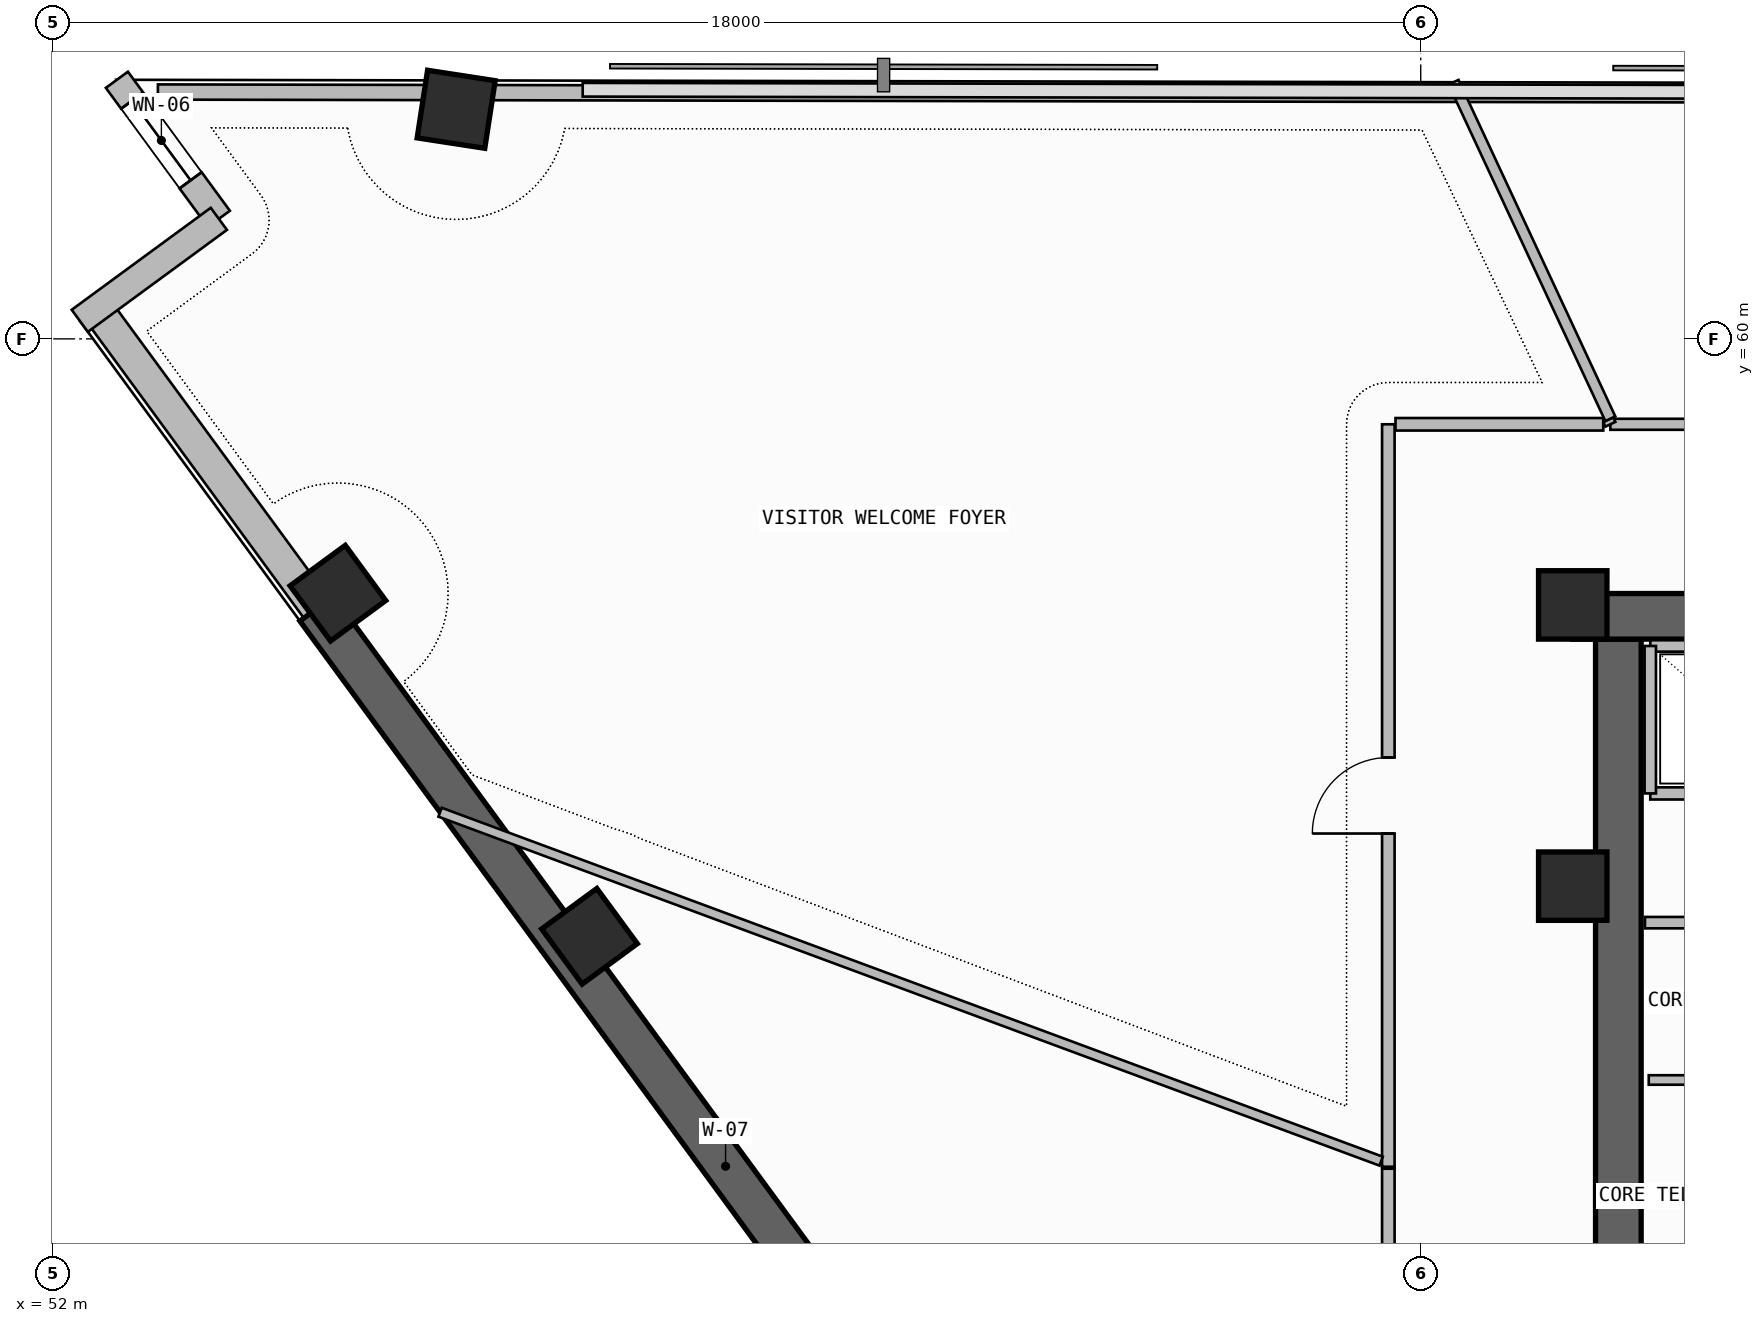
"""IFC4 building model, lengths in metres.
Left out: names, types, materials, properties, quantities, classifications, styles, units other than length and angle.
Written with IfcOpenShell. Run it as: python <this file> out.ifc"""

import sys

from ifc_helpers import new_model, si_unit, direction, frame, frame_2d, origin, origin_2d, place, context, subcontext, project, spatial, rectangle, extrude, element, fill, save


model = new_model("IFC4")
c1 = context("Model", 3, precision=1e-05, world=origin(), true_north=direction((0.0, 1.0)))
c2 = subcontext(c1, "Body", "Model", "MODEL_VIEW")
j1 = project(units=[si_unit("LENGTHUNIT", "METRE"), si_unit("PLANEANGLEUNIT", "RADIAN")], contexts=[c1])
p1 = place(None, origin())
s1 = spatial("IfcSite", under=j1, at=p1, CompositionType="ELEMENT")
p2 = place(p1, origin())
s2 = spatial("IfcBuilding", under=s1, at=p2, CompositionType="ELEMENT")
p3 = place(p2, frame((0.0, 0.0, 250.18)))
s3 = spatial("IfcBuildingStorey", under=s2, at=p3, CompositionType="ELEMENT", Elevation=250.18)
p4 = place(p3, frame((72.6, 43.35, -0.26), z_axis=(0.0, 0.0, 1.0), x_axis=(0.0, 1.0, 0.0)))
e1 = element("IfcWall", 1, at=p4, inside=s3, PredefinedType="SHEAR", context=c2, shape_type="SweptSolid", body=[
    extrude(rectangle(XDim=12.7, YDim=0.6, at=frame_2d((6.35, 0.0))), origin(), (0.0, 0.0, 1.0), 3.52),
])
p5 = place(p4, frame((1.35, 0.0, 0.26)))
e2 = element("IfcOpeningElement", 2, at=p5, cuts=e1, PredefinedType="OPENING", context=c2, shape_type="SweptSolid", body=[
    extrude(rectangle(XDim=1.2, YDim=2.2, at=frame_2d((0.6, 1.1))), frame((0.0, 0.31, 0.0), z_axis=(0.0, -1.0, 0.0), x_axis=(1.0, 0.0, 0.0)), (0.0, 0.0, 1.0), 0.62),
])
p6 = place(p3, frame((72.0, 56.35, -0.26), z_axis=(0.0, 0.0, 1.0), x_axis=(1.0, 0.0, 0.0)))
e3 = element("IfcWall", 3, at=p6, inside=s3, PredefinedType="SHEAR", context=c2, shape_type="SweptSolid", body=[
    extrude(rectangle(XDim=13.6, YDim=0.6, at=frame_2d((6.8, 0.0))), origin(), (0.0, 0.0, 1.0), 3.52),
])
for number, where, z_axis, x_axis in (
    (4, (72.0, 52.8, 0.0), (0.0, 0.0, 1.0), (1.0, 0.0, 0.0)),
    (5, (72.0, 56.5, 0.0), (0.0, 0.0, 1.0), (1.0, 0.0, 0.0)),
    (6, (57.309, 63.021, 0.0), (0.0, 0.0, 1.0), (0.152, 0.988, 0.0)),
    (7, (55.753, 56.654, 0.0), (0.0, 0.0, 1.0), (-0.591, 0.806, 0.0)),
    (8, (59.063, 52.14, 0.0), (0.0, 0.0, 1.0), (-0.591, 0.806, 0.0)),
):
    element("IfcColumn", number, at=place(p3, frame(where, z_axis=z_axis, x_axis=x_axis)), inside=s3, PredefinedType="COLUMN", context=c2, shape_type="SweptSolid", body=[
        extrude(rectangle(XDim=0.9, YDim=0.9, at=origin_2d()), origin(), (0.0, 0.0, 1.0), 3.52),
    ])
p7 = place(p3, frame((52.579, 60.4, 0.0), z_axis=(0.0, 0.0, 1.0), x_axis=(0.591311800505, -0.806443026248, 0.0)))
e9 = element("IfcWall", 9, at=p7, inside=s3, PredefinedType="SOLIDWALL", context=c2, shape_type="SweptSolid", body=[
    extrude(rectangle(XDim=4.898, YDim=0.42, at=frame_2d((2.449, 0.0))), origin(), (0.0, 0.0, 1.0), 2.645),
])
p8 = place(p3, frame((55.475, 56.45, -0.26), z_axis=(0.0, 0.0, 1.0), x_axis=(0.591309555876, -0.806444672082, 0.0)))
e10 = element("IfcWall", 10, at=p8, inside=s3, PredefinedType="SHEAR", context=c2, shape_type="SweptSolid", body=[
    extrude(rectangle(XDim=18.192, YDim=0.55, at=frame_2d((9.096, 0.0))), origin(), (0.0, 0.0, 1.0), 3.52),
])
p9 = place(p3, frame((52.845, 63.409, 0.0), z_axis=(0.0, 0.0, 1.0), x_axis=(0.591251685745, -0.806487101015, 0.0)))
e11 = element("IfcWall", 11, at=p9, inside=s3, PredefinedType="SOLIDWALL", context=c2, shape_type="SweptSolid", body=[
    extrude(rectangle(XDim=2.269, YDim=0.36, at=frame_2d((1.134, 0.0))), origin(), (0.0, 0.0, 1.0), 3.26),
])
p10 = place(p9, frame((0.34, 0.0, 0.45)))
e12 = element("IfcOpeningElement", 12, at=p10, cuts=e11, PredefinedType="OPENING", context=c2, shape_type="SweptSolid", body=[
    extrude(rectangle(XDim=1.3, YDim=2.4, at=frame_2d((0.65, 1.2))), frame((0.0, 0.19, 0.0), z_axis=(0.0, -1.0, 0.0), x_axis=(1.0, 0.0, 0.0)), (0.0, 0.0, 1.0), 0.38),
])
p11 = place(p3, frame((54.187, 61.579, 0.0), z_axis=(0.0, 0.0, 1.0), x_axis=(-0.806449475274, -0.591303005092, 0.0)))
e13 = element("IfcWall", 13, at=p11, inside=s3, PredefinedType="SOLIDWALL", context=c2, shape_type="SweptSolid", body=[
    extrude(rectangle(XDim=2.268, YDim=0.36, at=frame_2d((1.134, 0.0))), origin(), (0.0, 0.0, 1.0), 3.26),
])
p12 = place(p3, frame((83.332, 63.193, 0.0), z_axis=(0.0, 0.0, 1.0), x_axis=(-0.999998363757, 0.001809000383, 0.0)))
e14 = element("IfcWall", 14, at=p12, inside=s3, PredefinedType="PARAPET", context=c2, shape_type="SweptSolid", body=[
    extrude(rectangle(XDim=25.777, YDim=0.2, at=frame_2d((12.889, 0.0))), origin(), (0.0, 0.0, 1.0), 1.15),
])
p13 = place(p3, frame((57.064, 63.241, 0.0), z_axis=(0.0, 0.0, 1.0), x_axis=(-0.999998274159, 0.001857869529, 0.0)))
e15 = element("IfcWall", 15, at=p13, inside=s3, PredefinedType="PARAPET", context=c2, shape_type="SweptSolid", body=[
    extrude(rectangle(XDim=3.679, YDim=0.2, at=frame_2d((1.84, 0.0))), origin(), (0.0, 0.0, 1.0), 1.15),
])
p14 = place(p3, frame((72.95, 52.32, 0.0), z_axis=(0.0, 0.0, 1.0), x_axis=(1.0, 0.0, 0.0)))
e16 = element("IfcWall", 16, at=p14, inside=s3, PredefinedType="SOLIDWALL", context=c2, shape_type="SweptSolid", body=[
    extrude(rectangle(XDim=3.33, YDim=0.15, at=frame_2d((1.665, 0.0))), origin(), (0.0, 0.0, 1.0), 3.26),
])
p15 = place(p3, frame((73.0, 50.25, 0.0), z_axis=(0.0, 0.0, 1.0), x_axis=(1.0, 0.0, 0.0)))
e17 = element("IfcWall", 17, at=p15, inside=s3, PredefinedType="PARTITIONING", context=c2, shape_type="SweptSolid", body=[
    extrude(rectangle(XDim=3.28, YDim=0.125, at=frame_2d((1.64, 0.0))), origin(), (0.0, 0.0, 1.0), 3.26),
])
p16 = place(p3, frame((73.02, 54.02, 0.0), z_axis=(0.0, 0.0, 1.0), x_axis=(1.0, 0.0, 0.0)))
e18 = element("IfcWall", 18, at=p16, inside=s3, PredefinedType="SOLIDWALL", context=c2, shape_type="SweptSolid", body=[
    extrude(rectangle(XDim=12.08, YDim=0.16, at=frame_2d((6.04, 0.0))), origin(), (0.0, 0.0, 1.0), 3.26),
])
p17 = place(p16, frame((4.03, 0.0, 0.0)))
e19 = element("IfcOpeningElement", 19, at=p17, cuts=e18, PredefinedType="OPENING", context=c2, shape_type="SweptSolid", body=[
    extrude(rectangle(XDim=1.1, YDim=2.25, at=frame_2d((0.55, 1.125))), frame((0.0, 0.09, 0.0), z_axis=(0.0, -1.0, 0.0), x_axis=(1.0, 0.0, 0.0)), (0.0, 0.0, 1.0), 0.18),
])
p18 = place(p16, frame((6.28, 0.0, 0.0)))
e20 = element("IfcOpeningElement", 20, at=p18, cuts=e18, PredefinedType="OPENING", context=c2, shape_type="SweptSolid", body=[
    extrude(rectangle(XDim=1.1, YDim=2.25, at=frame_2d((0.55, 1.125))), frame((0.0, 0.09, 0.0), z_axis=(0.0, -1.0, 0.0), x_axis=(1.0, 0.0, 0.0)), (0.0, 0.0, 1.0), 0.18),
])
p19 = place(p16, frame((8.53, 0.0, 0.0)))
e21 = element("IfcOpeningElement", 21, at=p19, cuts=e18, PredefinedType="OPENING", context=c2, shape_type="SweptSolid", body=[
    extrude(rectangle(XDim=1.1, YDim=2.25, at=frame_2d((0.55, 1.125))), frame((0.0, 0.09, 0.0), z_axis=(0.0, -1.0, 0.0), x_axis=(1.0, 0.0, 0.0)), (0.0, 0.0, 1.0), 0.18),
])
p20 = place(p3, frame((73.02, 55.96, 0.0), z_axis=(0.0, 0.0, 1.0), x_axis=(1.0, 0.0, 0.0)))
e22 = element("IfcWall", 22, at=p20, inside=s3, PredefinedType="SOLIDWALL", context=c2, shape_type="SweptSolid", body=[
    extrude(rectangle(XDim=3.5, YDim=0.15, at=frame_2d((1.75, 0.0))), origin(), (0.0, 0.0, 1.0), 3.26),
])
p21 = place(p3, frame((73.02, 54.02, 0.0), z_axis=(0.0, 0.0, 1.0), x_axis=(0.0, 1.0, 0.0)))
e23 = element("IfcWall", 23, at=p21, inside=s3, PredefinedType="PLUMBINGWALL", context=c2, shape_type="SweptSolid", body=[
    extrude(rectangle(XDim=1.94, YDim=0.15, at=frame_2d((0.97, 0.0))), origin(), (0.0, 0.0, 1.0), 3.26),
])
p22 = place(p3, frame((77.35, 58.876, 0.0), z_axis=(0.0, 0.0, 1.0), x_axis=(-1.0, 0.0, 0.0)))
e24 = element("IfcWall", 24, at=p22, inside=s3, PredefinedType="PARTITIONING", context=c2, shape_type="SweptSolid", body=[
    extrude(rectangle(XDim=4.855, YDim=0.145, at=frame_2d((2.427, 0.0))), origin(), (0.0, 0.0, 1.0), 3.26),
])
p23 = place(p22, frame((1.978, 0.0, 0.0)))
e25 = element("IfcOpeningElement", 25, at=p23, cuts=e24, PredefinedType="OPENING", context=c2, shape_type="SweptSolid", body=[
    extrude(rectangle(XDim=0.9, YDim=2.1, at=frame_2d((0.45, 1.05))), frame((0.0, 0.083, 0.0), z_axis=(0.0, -1.0, 0.0), x_axis=(1.0, 0.0, 0.0)), (0.0, 0.0, 1.0), 0.165),
])
p24 = place(p3, frame((72.495, 58.876, 0.0), z_axis=(0.0, 0.0, 1.0), x_axis=(-0.433926181424, 0.900948427533, 0.0)))
e26 = element("IfcWall", 26, at=p24, inside=s3, PredefinedType="PARTITIONING", context=c2, shape_type="SweptSolid", body=[
    extrude(rectangle(XDim=0.066, YDim=0.145, at=frame_2d((0.033, 0.0))), origin(), (0.0, 0.0, 1.0), 3.26),
])
p25 = place(p3, frame((72.494, 58.95, 0.0), z_axis=(0.0, 0.0, 1.0), x_axis=(-0.42234902314, 0.906433286377, 0.0)))
e27 = element("IfcWall", 27, at=p25, inside=s3, PredefinedType="PARTITIONING", context=c2, shape_type="SweptSolid", body=[
    extrude(rectangle(XDim=4.884, YDim=0.145, at=frame_2d((2.442, 0.0))), origin(), (0.0, 0.0, 1.0), 3.26),
])
p26 = place(p3, frame((69.573, 58.876, 0.0), z_axis=(0.0, 0.0, 1.0), x_axis=(0.0, -1.0, 0.0)))
e28 = element("IfcWall", 28, at=p26, inside=s3, PredefinedType="PARTITIONING", context=c2, shape_type="SweptSolid", body=[
    extrude(rectangle(XDim=9.768, YDim=0.165, at=frame_2d((4.884, 0.0))), origin(), (0.0, 0.0, 1.0), 2.745),
])
p27 = place(p26, frame((4.384, 0.0, 0.0)))
e29 = element("IfcOpeningElement", 29, at=p27, cuts=e28, PredefinedType="OPENING", context=c2, shape_type="SweptSolid", body=[
    extrude(rectangle(XDim=1.0, YDim=2.2, at=frame_2d((0.5, 1.1))), frame((0.0, 0.093, 0.0), z_axis=(0.0, -1.0, 0.0), x_axis=(1.0, 0.0, 0.0)), (0.0, 0.0, 1.0), 0.185),
])
p28 = place(p3, frame((72.401, 58.876, 0.0), z_axis=(0.0, 0.0, 1.0), x_axis=(-1.0, 0.0, 0.0)))
e30 = element("IfcWall", 30, at=p28, inside=s3, PredefinedType="PARTITIONING", context=c2, shape_type="SweptSolid", body=[
    extrude(rectangle(XDim=2.733, YDim=0.165, at=frame_2d((1.367, 0.0))), origin(), (0.0, 0.0, 1.0), 3.26),
])
p29 = place(p3, frame((69.479, 49.182, 0.0), z_axis=(0.0, 0.0, 1.0), x_axis=(-0.937624257071, 0.347650330868, 0.0)))
e31 = element("IfcWall", 31, at=p29, inside=s3, PredefinedType="PARTITIONING", context=c2, shape_type="SweptSolid", body=[
    extrude(rectangle(XDim=13.205, YDim=0.125, at=frame_2d((6.603, 0.0))), origin(), (0.0, 0.0, 1.0), 2.645),
])
p30 = place(p3, frame((69.573, 49.083, 0.0), z_axis=(0.0, 0.0, 1.0), x_axis=(0.0, -1.0, 0.0)))
e32 = element("IfcWall", 32, at=p30, inside=s3, PredefinedType="PARTITIONING", context=c2, shape_type="SweptSolid", body=[
    extrude(rectangle(XDim=7.396, YDim=0.165, at=frame_2d((3.698, 0.0))), origin(), (0.0, 0.0, 1.0), 3.26),
])
p31 = place(p30, frame((3.198, 0.0, 0.0)))
e33 = element("IfcOpeningElement", 33, at=p31, cuts=e32, PredefinedType="OPENING", context=c2, shape_type="SweptSolid", body=[
    extrude(rectangle(XDim=1.0, YDim=2.2, at=frame_2d((0.5, 1.1))), frame((0.0, 0.093, 0.0), z_axis=(0.0, -1.0, 0.0), x_axis=(1.0, 0.0, 0.0)), (0.0, 0.0, 1.0), 0.185),
])
p32 = place(p10, origin())
e34 = element("IfcWindow", 34, at=p32, inside=s3, PartitioningType="SINGLE_PANEL", PredefinedType="WINDOW", context=c2, shape_type="SweptSolid", body=[
    extrude(rectangle(XDim=1.3, YDim=2.4, at=frame_2d((0.65, 1.2))), frame((0.0, 0.03, 0.0), z_axis=(0.0, -1.0, 0.0), x_axis=(1.0, 0.0, 0.0)), (0.0, 0.0, 1.0), 0.06),
])
fill(e12, e34)
p33 = place(p27, frame((1.0, 0.0, 0.0), z_axis=(0.0, 0.0, 1.0), x_axis=(-1.0, 0.0, 0.0)))
e35 = element("IfcDoor", 35, at=p33, inside=s3, OperationType="SINGLE_SWING_LEFT", PredefinedType="DOOR", context=c2, shape_type="SweptSolid", body=[
    extrude(rectangle(XDim=1.0, YDim=2.2, at=frame_2d((0.5, 1.1))), frame((0.0, 0.025, 0.0), z_axis=(0.0, -1.0, 0.0), x_axis=(1.0, 0.0, 0.0)), (0.0, 0.0, 1.0), 0.05),
])
fill(e29, e35)
save(model, sys.argv[1])
